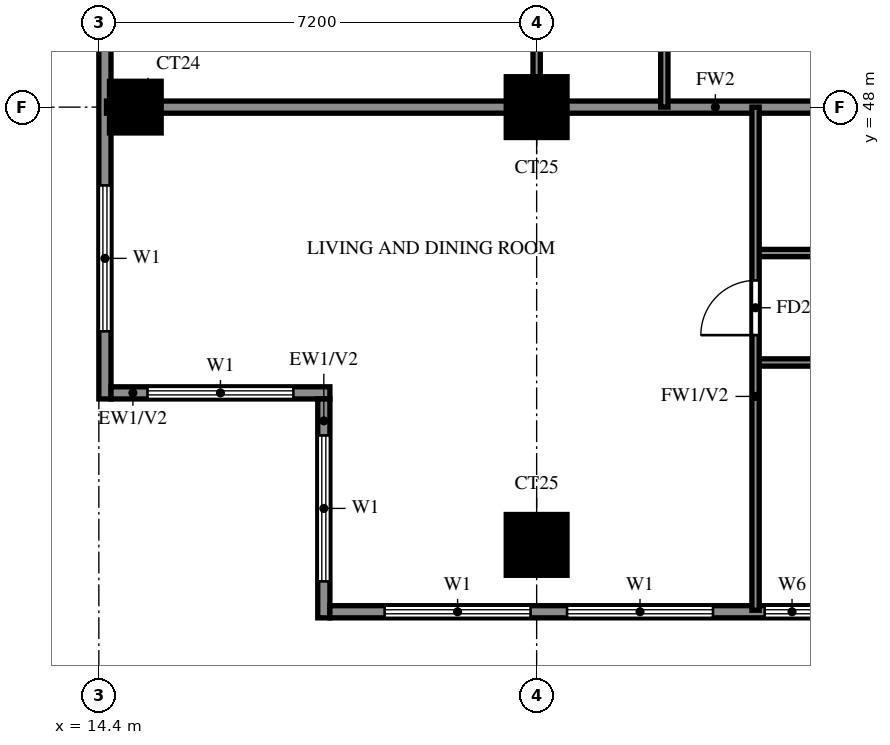
"""IFC4 building model, lengths in metres.
Left out: names, types, materials, properties, quantities, classifications, styles, units other than length and angle.
Written with IfcOpenShell. Run it as: python <this file> out.ifc"""

import sys

from ifc_helpers import new_model, si_unit, direction, frame, frame_2d, origin, origin_2d, place, context, subcontext, project, spatial, rectangle, extrude, source, transform, mapped, element, fill, save


model = new_model("IFC4")
c1 = context("Model", 3, precision=1e-05, world=origin(), true_north=direction((0.0, 1.0)))
c2 = subcontext(c1, "Body", "Model", "MODEL_VIEW")
j1 = project(units=[si_unit("LENGTHUNIT", "METRE"), si_unit("PLANEANGLEUNIT", "RADIAN")], contexts=[c1])
p1 = place(None, origin())
s1 = spatial("IfcSite", under=j1, at=p1, CompositionType="ELEMENT")
p2 = place(p1, origin())
s2 = spatial("IfcBuilding", under=s1, at=p2, CompositionType="ELEMENT")
p3 = place(p2, frame((0.0, 0.0, 146.5)))
s3 = spatial("IfcBuildingStorey", under=s2, at=p3, CompositionType="ELEMENT", Elevation=146.5)
m1 = source(origin(), c2, "Body", "SweptSolid", [
    extrude(rectangle(XDim=1.0, YDim=1.0, at=origin_2d()), origin(), (0.0, 0.0, 1.0), 3.2),
])
p4 = place(p3, frame((21.6, 40.8, 0.0), z_axis=(0.0, 0.0, 1.0), x_axis=(1.0, 0.0, 0.0)))
e1 = element("IfcColumn", 1, at=p4, inside=s3, PredefinedType="COLUMN", context=c2, shape_type="MappedRepresentation", body=[
    mapped(m1, transform((0.0, 0.0, 0.0))),
])
m2 = source(origin(), c2, "Body", "SweptSolid", [
    extrude(rectangle(XDim=0.85, YDim=0.85, at=origin_2d()), origin(), (0.0, 0.0, 1.0), 3.2),
])
p5 = place(p3, frame((15.0, 48.0, 0.0), z_axis=(0.0, 0.0, 1.0), x_axis=(1.0, 0.0, 0.0)))
e2 = element("IfcColumn", 2, at=p5, inside=s3, PredefinedType="COLUMN", context=c2, shape_type="MappedRepresentation", body=[
    mapped(m2, transform((0.0, 0.0, 0.0))),
])
p6 = place(p3, frame((21.6, 48.0, 0.0), z_axis=(0.0, 0.0, 1.0), x_axis=(1.0, 0.0, 0.0)))
e3 = element("IfcColumn", 3, at=p6, inside=s3, PredefinedType="COLUMN", context=c2, shape_type="MappedRepresentation", body=[
    mapped(m1, transform((0.0, 0.0, 0.0))),
])
p7 = place(p3, frame((14.5, 76.6, 0.0), z_axis=(0.0, 0.0, 1.0), x_axis=(0.0, -1.0, 0.0)))
e4 = element("IfcWall", 4, at=p7, inside=s3, PredefinedType="SOLIDWALL", context=c2, shape_type="SweptSolid", body=[
    extrude(rectangle(XDim=33.4, YDim=0.2, at=frame_2d((16.7, 0.0))), origin(), (0.0, 0.0, 1.0), 3.2),
])
p8 = place(p7, frame((29.887, 0.0, 0.6)))
e5 = element("IfcOpeningElement", 5, at=p8, cuts=e4, PredefinedType="OPENING", context=c2, shape_type="SweptSolid", body=[
    extrude(rectangle(XDim=2.4, YDim=2.4, at=frame_2d((1.2, 1.2))), frame((0.0, 0.11, 0.0), z_axis=(0.0, -1.0, 0.0), x_axis=(1.0, 0.0, 0.0)), (0.0, 0.0, 1.0), 0.22),
])
p9 = place(p7, frame((22.358, 0.0, 0.6)))
e6 = element("IfcOpeningElement", 6, at=p9, cuts=e4, PredefinedType="OPENING", context=c2, shape_type="SweptSolid", body=[
    extrude(rectangle(XDim=2.4, YDim=2.4, at=frame_2d((1.2, 1.2))), frame((0.0, 0.11, 0.0), z_axis=(0.0, -1.0, 0.0), x_axis=(1.0, 0.0, 0.0)), (0.0, 0.0, 1.0), 0.22),
])
p10 = place(p7, frame((25.242, 0.0, 0.6)))
e7 = element("IfcOpeningElement", 7, at=p10, cuts=e4, PredefinedType="OPENING", context=c2, shape_type="SweptSolid", body=[
    extrude(rectangle(XDim=2.4, YDim=2.4, at=frame_2d((1.2, 1.2))), frame((0.0, 0.11, 0.0), z_axis=(0.0, -1.0, 0.0), x_axis=(1.0, 0.0, 0.0)), (0.0, 0.0, 1.0), 0.22),
])
p11 = place(p7, frame((14.988, 0.0, 0.6)))
e8 = element("IfcOpeningElement", 8, at=p11, cuts=e4, PredefinedType="OPENING", context=c2, shape_type="SweptSolid", body=[
    extrude(rectangle(XDim=2.4, YDim=2.4, at=frame_2d((1.2, 1.2))), frame((0.0, 0.11, 0.0), z_axis=(0.0, -1.0, 0.0), x_axis=(1.0, 0.0, 0.0)), (0.0, 0.0, 1.0), 0.22),
])
p12 = place(p7, frame((18.962, 0.0, 1.5)))
e9 = element("IfcOpeningElement", 9, at=p12, cuts=e4, PredefinedType="OPENING", context=c2, shape_type="SweptSolid", body=[
    extrude(rectangle(XDim=0.9, YDim=0.9, at=frame_2d((0.45, 0.45))), frame((0.0, 0.11, 0.0), z_axis=(0.0, -1.0, 0.0), x_axis=(1.0, 0.0, 0.0)), (0.0, 0.0, 1.0), 0.22),
])
p13 = place(p7, frame((11.012, 0.0, 0.6)))
e10 = element("IfcOpeningElement", 10, at=p13, cuts=e4, PredefinedType="OPENING", context=c2, shape_type="SweptSolid", body=[
    extrude(rectangle(XDim=2.4, YDim=2.4, at=frame_2d((1.2, 1.2))), frame((0.0, 0.11, 0.0), z_axis=(0.0, -1.0, 0.0), x_axis=(1.0, 0.0, 0.0)), (0.0, 0.0, 1.0), 0.22),
])
p14 = place(p7, frame((7.788, 0.0, 0.6)))
e11 = element("IfcOpeningElement", 11, at=p14, cuts=e4, PredefinedType="OPENING", context=c2, shape_type="SweptSolid", body=[
    extrude(rectangle(XDim=2.4, YDim=2.4, at=frame_2d((1.2, 1.2))), frame((0.0, 0.11, 0.0), z_axis=(0.0, -1.0, 0.0), x_axis=(1.0, 0.0, 0.0)), (0.0, 0.0, 1.0), 0.22),
])
p15 = place(p7, frame((4.562, 0.0, 1.5)))
e12 = element("IfcOpeningElement", 12, at=p15, cuts=e4, PredefinedType="OPENING", context=c2, shape_type="SweptSolid", body=[
    extrude(rectangle(XDim=0.9, YDim=0.9, at=frame_2d((0.45, 0.45))), frame((0.0, 0.11, 0.0), z_axis=(0.0, -1.0, 0.0), x_axis=(1.0, 0.0, 0.0)), (0.0, 0.0, 1.0), 0.22),
])
p16 = place(p7, frame((0.6, 0.0, 0.6)))
e13 = element("IfcOpeningElement", 13, at=p16, cuts=e4, PredefinedType="OPENING", context=c2, shape_type="SweptSolid", body=[
    extrude(rectangle(XDim=2.4, YDim=2.4, at=frame_2d((1.2, 1.2))), frame((0.0, 0.11, 0.0), z_axis=(0.0, -1.0, 0.0), x_axis=(1.0, 0.0, 0.0)), (0.0, 0.0, 1.0), 0.22),
])
p17 = place(p3, frame((14.6, 43.3, 0.0), z_axis=(0.0, 0.0, 1.0), x_axis=(1.0, 0.0, 0.0)))
e14 = element("IfcWall", 14, at=p17, inside=s3, PredefinedType="SOLIDWALL", context=c2, shape_type="SweptSolid", body=[
    extrude(rectangle(XDim=3.6, YDim=0.2, at=frame_2d((1.8, 0.0))), origin(), (0.0, 0.0, 1.0), 3.2),
])
p18 = place(p17, frame((0.6, 0.0, 0.6)))
e15 = element("IfcOpeningElement", 15, at=p18, cuts=e14, PredefinedType="OPENING", context=c2, shape_type="SweptSolid", body=[
    extrude(rectangle(XDim=2.4, YDim=2.4, at=frame_2d((1.2, 1.2))), frame((0.0, 0.11, 0.0), z_axis=(0.0, -1.0, 0.0), x_axis=(1.0, 0.0, 0.0)), (0.0, 0.0, 1.0), 0.22),
])
p19 = place(p3, frame((18.1, 43.2, 0.0), z_axis=(0.0, 0.0, 1.0), x_axis=(0.0, -1.0, 0.0)))
e16 = element("IfcWall", 16, at=p19, inside=s3, PredefinedType="SOLIDWALL", context=c2, shape_type="SweptSolid", body=[
    extrude(rectangle(XDim=3.6, YDim=0.2, at=frame_2d((1.8, 0.0))), origin(), (0.0, 0.0, 1.0), 3.2),
])
p20 = place(p19, frame((0.6, 0.0, 0.6)))
e17 = element("IfcOpeningElement", 17, at=p20, cuts=e16, PredefinedType="OPENING", context=c2, shape_type="SweptSolid", body=[
    extrude(rectangle(XDim=2.4, YDim=2.4, at=frame_2d((1.2, 1.2))), frame((0.0, 0.11, 0.0), z_axis=(0.0, -1.0, 0.0), x_axis=(1.0, 0.0, 0.0)), (0.0, 0.0, 1.0), 0.22),
])
p21 = place(p3, frame((18.2, 39.7, 0.0), z_axis=(0.0, 0.0, 1.0), x_axis=(1.0, 0.0, 0.0)))
e18 = element("IfcWall", 18, at=p21, inside=s3, PredefinedType="SOLIDWALL", context=c2, shape_type="SweptSolid", body=[
    extrude(rectangle(XDim=23.8, YDim=0.2, at=frame_2d((11.9, 0.0))), origin(), (0.0, 0.0, 1.0), 3.2),
])
p22 = place(p21, frame((11.5, 0.0, 0.0)))
e19 = element("IfcOpeningElement", 19, at=p22, cuts=e18, PredefinedType="OPENING", context=c2, shape_type="SweptSolid", body=[
    extrude(rectangle(XDim=1.8, YDim=2.4, at=frame_2d((0.9, 1.2))), frame((0.0, 0.11, 0.0), z_axis=(0.0, -1.0, 0.0), x_axis=(1.0, 0.0, 0.0)), (0.0, 0.0, 1.0), 0.22),
])
p23 = place(p21, frame((0.9, 0.0, 0.6)))
e20 = element("IfcOpeningElement", 20, at=p23, cuts=e18, PredefinedType="OPENING", context=c2, shape_type="SweptSolid", body=[
    extrude(rectangle(XDim=2.4, YDim=2.4, at=frame_2d((1.2, 1.2))), frame((0.0, 0.11, 0.0), z_axis=(0.0, -1.0, 0.0), x_axis=(1.0, 0.0, 0.0)), (0.0, 0.0, 1.0), 0.22),
])
p24 = place(p21, frame((3.9, 0.0, 0.6)))
e21 = element("IfcOpeningElement", 21, at=p24, cuts=e18, PredefinedType="OPENING", context=c2, shape_type="SweptSolid", body=[
    extrude(rectangle(XDim=2.4, YDim=2.4, at=frame_2d((1.2, 1.2))), frame((0.0, 0.11, 0.0), z_axis=(0.0, -1.0, 0.0), x_axis=(1.0, 0.0, 0.0)), (0.0, 0.0, 1.0), 0.22),
])
p25 = place(p21, frame((7.15, 0.0, 1.5)))
e22 = element("IfcOpeningElement", 22, at=p25, cuts=e18, PredefinedType="OPENING", context=c2, shape_type="SweptSolid", body=[
    extrude(rectangle(XDim=0.9, YDim=0.9, at=frame_2d((0.45, 0.45))), frame((0.0, 0.11, 0.0), z_axis=(0.0, -1.0, 0.0), x_axis=(1.0, 0.0, 0.0)), (0.0, 0.0, 1.0), 0.22),
])
p26 = place(p21, frame((9.25, 0.0, 1.5)))
e23 = element("IfcOpeningElement", 23, at=p26, cuts=e18, PredefinedType="OPENING", context=c2, shape_type="SweptSolid", body=[
    extrude(rectangle(XDim=0.9, YDim=0.9, at=frame_2d((0.45, 0.45))), frame((0.0, 0.11, 0.0), z_axis=(0.0, -1.0, 0.0), x_axis=(1.0, 0.0, 0.0)), (0.0, 0.0, 1.0), 0.22),
])
p27 = place(p21, frame((13.75, 0.0, 0.6)))
e24 = element("IfcOpeningElement", 24, at=p27, cuts=e18, PredefinedType="OPENING", context=c2, shape_type="SweptSolid", body=[
    extrude(rectangle(XDim=0.9, YDim=2.4, at=frame_2d((0.45, 1.2))), frame((0.0, 0.11, 0.0), z_axis=(0.0, -1.0, 0.0), x_axis=(1.0, 0.0, 0.0)), (0.0, 0.0, 1.0), 0.22),
])
p28 = place(p3, frame((14.525, 48.0, 0.0), z_axis=(0.0, 0.0, 1.0), x_axis=(1.0, 0.0, 0.0)))
e25 = element("IfcWall", 25, at=p28, inside=s3, PredefinedType="SOLIDWALL", context=c2, shape_type="SweptSolid", body=[
    extrude(rectangle(XDim=19.075, YDim=0.2, at=frame_2d((9.538, 0.0))), origin(), (0.0, 0.0, 1.0), 3.2),
])
p29 = place(p3, frame((25.2, 43.8, 0.0), z_axis=(0.0, 0.0, 1.0), x_axis=(1.0, 0.0, 0.0)))
e26 = element("IfcWall", 26, at=p29, inside=s3, PredefinedType="PARTITIONING", context=c2, shape_type="SweptSolid", body=[
    extrude(rectangle(XDim=8.4, YDim=0.12, at=frame_2d((4.2, 0.0))), origin(), (0.0, 0.0, 1.0), 3.2),
])
p30 = place(p29, frame((1.35, 0.0, 0.0)))
e27 = element("IfcOpeningElement", 27, at=p30, cuts=e26, PredefinedType="OPENING", context=c2, shape_type="SweptSolid", body=[
    extrude(rectangle(XDim=0.9, YDim=2.1, at=frame_2d((0.45, 1.05))), frame((0.0, 0.07, 0.0), z_axis=(0.0, -1.0, 0.0), x_axis=(1.0, 0.0, 0.0)), (0.0, 0.0, 1.0), 0.14),
])
p31 = place(p29, frame((5.55, 0.0, 0.0)))
e28 = element("IfcOpeningElement", 28, at=p31, cuts=e26, PredefinedType="OPENING", context=c2, shape_type="SweptSolid", body=[
    extrude(rectangle(XDim=0.9, YDim=2.1, at=frame_2d((0.45, 1.05))), frame((0.0, 0.07, 0.0), z_axis=(0.0, -1.0, 0.0), x_axis=(1.0, 0.0, 0.0)), (0.0, 0.0, 1.0), 0.14),
])
p32 = place(p3, frame((25.2, 45.6, 0.0), z_axis=(0.0, 0.0, 1.0), x_axis=(1.0, 0.0, 0.0)))
e29 = element("IfcWall", 29, at=p32, inside=s3, PredefinedType="PARTITIONING", context=c2, shape_type="SweptSolid", body=[
    extrude(rectangle(XDim=6.0, YDim=0.12, at=frame_2d((3.0, 0.0))), origin(), (0.0, 0.0, 1.0), 3.2),
])
p33 = place(p32, frame((2.55, 0.0, 0.0)))
e30 = element("IfcOpeningElement", 30, at=p33, cuts=e29, PredefinedType="OPENING", context=c2, shape_type="SweptSolid", body=[
    extrude(rectangle(XDim=0.9, YDim=2.1, at=frame_2d((0.45, 1.05))), frame((0.0, 0.07, 0.0), z_axis=(0.0, -1.0, 0.0), x_axis=(1.0, 0.0, 0.0)), (0.0, 0.0, 1.0), 0.14),
])
p34 = place(p3, frame((21.6, 48.0, 0.0), z_axis=(0.0, 0.0, 1.0), x_axis=(0.0, 1.0, 0.0)))
e31 = element("IfcWall", 31, at=p34, inside=s3, PredefinedType="PARTITIONING", context=c2, shape_type="SweptSolid", body=[
    extrude(rectangle(XDim=7.2, YDim=0.12, at=frame_2d((3.6, 0.0))), origin(), (0.0, 0.0, 1.0), 3.2),
])
p35 = place(p34, frame((2.85, 0.0, 0.0)))
e32 = element("IfcOpeningElement", 32, at=p35, cuts=e31, PredefinedType="OPENING", context=c2, shape_type="SweptSolid", body=[
    extrude(rectangle(XDim=1.5, YDim=2.1, at=frame_2d((0.75, 1.05))), frame((0.0, 0.07, 0.0), z_axis=(0.0, -1.0, 0.0), x_axis=(1.0, 0.0, 0.0)), (0.0, 0.0, 1.0), 0.14),
])
p36 = place(p3, frame((23.7, 48.0, 0.0), z_axis=(0.0, 0.0, 1.0), x_axis=(0.0, 1.0, 0.0)))
e33 = element("IfcWall", 33, at=p36, inside=s3, PredefinedType="PARTITIONING", context=c2, shape_type="SweptSolid", body=[
    extrude(rectangle(XDim=3.6, YDim=0.12, at=frame_2d((1.8, 0.0))), origin(), (0.0, 0.0, 1.0), 3.2),
])
p37 = place(p3, frame((25.2, 39.725, 0.0), z_axis=(0.0, 0.0, 1.0), x_axis=(0.0, 1.0, 0.0)))
e34 = element("IfcWall", 34, at=p37, inside=s3, PredefinedType="PARTITIONING", context=c2, shape_type="SweptSolid", body=[
    extrude(rectangle(XDim=8.275, YDim=0.12, at=frame_2d((4.137, 0.0))), origin(), (0.0, 0.0, 1.0), 3.2),
])
p38 = place(p37, frame((4.525, 0.0, 0.0)))
e35 = element("IfcOpeningElement", 35, at=p38, cuts=e34, PredefinedType="OPENING", context=c2, shape_type="SweptSolid", body=[
    extrude(rectangle(XDim=0.9, YDim=2.1, at=frame_2d((0.45, 1.05))), frame((0.0, 0.07, 0.0), z_axis=(0.0, -1.0, 0.0), x_axis=(1.0, 0.0, 0.0)), (0.0, 0.0, 1.0), 0.14),
])
p39 = place(p8, origin())
e36 = element("IfcWindow", 36, at=p39, inside=s3, PartitioningType="DOUBLE_PANEL_VERTICAL", PredefinedType="WINDOW", context=c2, shape_type="SweptSolid", body=[
    extrude(rectangle(XDim=2.4, YDim=2.4, at=frame_2d((1.2, 1.2))), frame((0.0, 0.03, 0.0), z_axis=(0.0, -1.0, 0.0), x_axis=(1.0, 0.0, 0.0)), (0.0, 0.0, 1.0), 0.06),
])
fill(e5, e36)
p40 = place(p18, origin())
e37 = element("IfcWindow", 37, at=p40, inside=s3, PartitioningType="DOUBLE_PANEL_VERTICAL", PredefinedType="WINDOW", context=c2, shape_type="SweptSolid", body=[
    extrude(rectangle(XDim=2.4, YDim=2.4, at=frame_2d((1.2, 1.2))), frame((0.0, 0.03, 0.0), z_axis=(0.0, -1.0, 0.0), x_axis=(1.0, 0.0, 0.0)), (0.0, 0.0, 1.0), 0.06),
])
fill(e15, e37)
p41 = place(p20, origin())
e38 = element("IfcWindow", 38, at=p41, inside=s3, PartitioningType="DOUBLE_PANEL_VERTICAL", PredefinedType="WINDOW", context=c2, shape_type="SweptSolid", body=[
    extrude(rectangle(XDim=2.4, YDim=2.4, at=frame_2d((1.2, 1.2))), frame((0.0, 0.03, 0.0), z_axis=(0.0, -1.0, 0.0), x_axis=(1.0, 0.0, 0.0)), (0.0, 0.0, 1.0), 0.06),
])
fill(e17, e38)
p42 = place(p23, origin())
e39 = element("IfcWindow", 39, at=p42, inside=s3, PartitioningType="DOUBLE_PANEL_VERTICAL", PredefinedType="WINDOW", context=c2, shape_type="SweptSolid", body=[
    extrude(rectangle(XDim=2.4, YDim=2.4, at=frame_2d((1.2, 1.2))), frame((0.0, 0.03, 0.0), z_axis=(0.0, -1.0, 0.0), x_axis=(1.0, 0.0, 0.0)), (0.0, 0.0, 1.0), 0.06),
])
fill(e20, e39)
p43 = place(p24, origin())
e40 = element("IfcWindow", 40, at=p43, inside=s3, PartitioningType="DOUBLE_PANEL_VERTICAL", PredefinedType="WINDOW", context=c2, shape_type="SweptSolid", body=[
    extrude(rectangle(XDim=2.4, YDim=2.4, at=frame_2d((1.2, 1.2))), frame((0.0, 0.03, 0.0), z_axis=(0.0, -1.0, 0.0), x_axis=(1.0, 0.0, 0.0)), (0.0, 0.0, 1.0), 0.06),
])
fill(e21, e40)
p44 = place(p25, origin())
e41 = element("IfcWindow", 41, at=p44, inside=s3, PartitioningType="SINGLE_PANEL", PredefinedType="WINDOW", context=c2, shape_type="SweptSolid", body=[
    extrude(rectangle(XDim=0.9, YDim=0.9, at=frame_2d((0.45, 0.45))), frame((0.0, 0.03, 0.0), z_axis=(0.0, -1.0, 0.0), x_axis=(1.0, 0.0, 0.0)), (0.0, 0.0, 1.0), 0.06),
])
fill(e22, e41)
p45 = place(p38, origin())
e42 = element("IfcDoor", 42, at=p45, inside=s3, OperationType="SINGLE_SWING_RIGHT", PredefinedType="DOOR", context=c2, shape_type="SweptSolid", body=[
    extrude(rectangle(XDim=0.9, YDim=2.1, at=frame_2d((0.45, 1.05))), frame((0.0, 0.025, 0.0), z_axis=(0.0, -1.0, 0.0), x_axis=(1.0, 0.0, 0.0)), (0.0, 0.0, 1.0), 0.05),
])
fill(e35, e42)
save(model, sys.argv[1])
